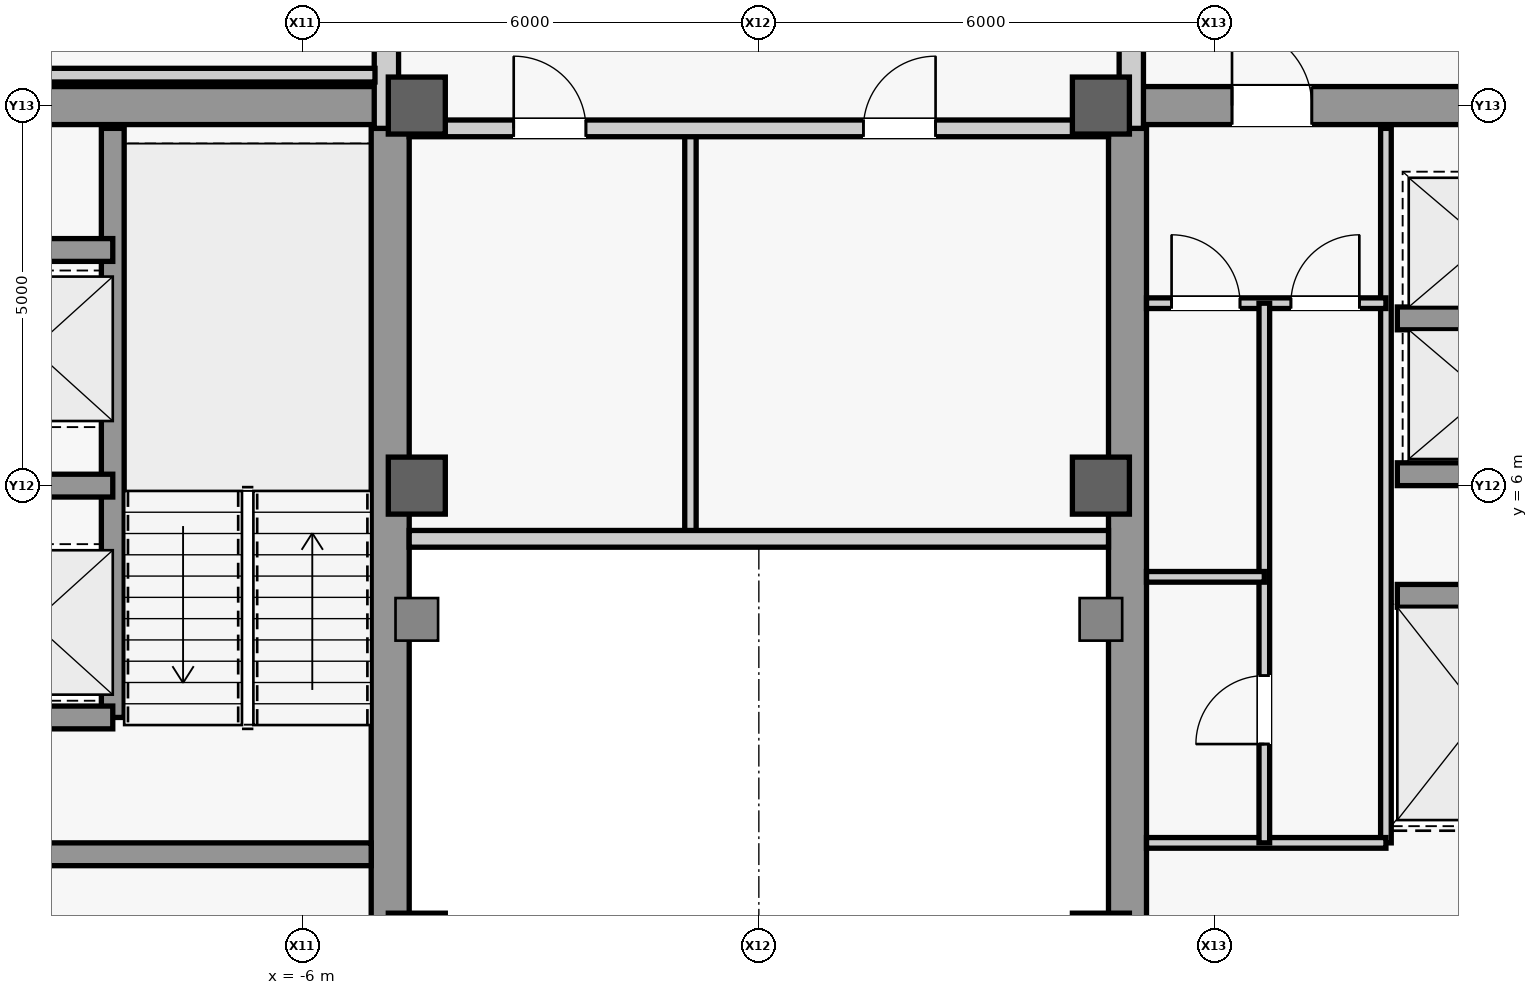
"""IFC4 building model, lengths in metres.
Left out: names, types, materials, properties, quantities, classifications, styles, units other than length and angle.
Written with IfcOpenShell. Run it as: python <this file> out.ifc"""

import sys

from ifc_helpers import new_model, si_unit, direction, frame, frame_2d, origin, origin_2d, place, context, subcontext, project, spatial, rectangle, extrude, source, transform, mapped, element, fill, save


model = new_model("IFC4")
c1 = context("Model", 3, precision=1e-05, world=origin(), true_north=direction((0.0, 1.0)))
c2 = subcontext(c1, "Body", "Model", "MODEL_VIEW")
j1 = project(units=[si_unit("LENGTHUNIT", "METRE"), si_unit("PLANEANGLEUNIT", "RADIAN")], contexts=[c1])
p1 = place(None, origin())
s1 = spatial("IfcSite", under=j1, at=p1, CompositionType="ELEMENT")
p2 = place(p1, origin())
s2 = spatial("IfcBuilding", under=s1, at=p2, CompositionType="ELEMENT")
p3 = place(p2, frame((0.0, 0.0, 350.3)))
s3 = spatial("IfcBuildingStorey", under=s2, at=p3, CompositionType="ELEMENT", Elevation=350.3)
m1 = source(origin(), c2, "Body", "SweptSolid", [
    extrude(rectangle(XDim=21.4, YDim=0.5, at=frame_2d((10.7, 0.0))), origin(), (0.0, 0.0, 1.0), 3.74),
])
for number, where, z_axis, x_axis in (
    (1, (-4.85, -10.7, 0.0), (0.0, 0.0, 1.0), (0.0, 1.0, 0.0)),
    (2, (4.85, -10.7, 0.0), (0.0, 0.0, 1.0), (0.0, 1.0, 0.0)),
):
    element("IfcWall", number, at=place(p3, frame(where, z_axis=z_axis, x_axis=x_axis)), inside=s3, PredefinedType="SHEAR", context=c2, shape_type="MappedRepresentation", body=[
        mapped(m1, transform((0.0, 0.0, 0.0), scale=1.0)),
    ])
m2 = source(origin(), c2, "Body", "SweptSolid", [
    extrude(rectangle(XDim=5.9, YDim=0.5, at=frame_2d((2.95, 0.0))), origin(), (0.0, 0.0, 1.0), 3.74),
])
p4 = place(p3, frame((-10.75, 11.0, 0.0), z_axis=(0.0, 0.0, 1.0), x_axis=(1.0, 0.0, 0.0)))
e3 = element("IfcWall", 3, at=p4, inside=s3, PredefinedType="SHEAR", context=c2, shape_type="MappedRepresentation", body=[
    mapped(m2, transform((0.0, 0.0, 0.0), scale=1.0)),
])
p5 = place(p3, frame((4.85, 11.0, 0.0), z_axis=(0.0, 0.0, 1.0), x_axis=(1.0, 0.0, 0.0)))
e4 = element("IfcWall", 4, at=p5, inside=s3, PredefinedType="SHEAR", context=c2, shape_type="MappedRepresentation", body=[
    mapped(m2, transform((0.0, 0.0, 0.0), scale=1.0)),
])
m3 = source(origin(), c2, "Body", "SweptSolid", [
    extrude(rectangle(XDim=1.05, YDim=2.2, at=frame_2d((0.525, 1.1))), frame((0.0, 0.26, 0.0), z_axis=(0.0, -1.0, 0.0), x_axis=(1.0, 0.0, 0.0)), (0.0, 0.0, 1.0), 0.52),
])
p6 = place(p5, frame((1.375, 0.0, 0.0)))
e5 = element("IfcOpeningElement", 5, at=p6, cuts=e4, PredefinedType="OPENING", context=c2, shape_type="MappedRepresentation", body=[
    mapped(m3, transform((0.0, 0.0, 0.0), scale=1.0)),
])
m4 = source(origin(), c2, "Body", "SweptSolid", [
    extrude(rectangle(XDim=5.65, YDim=0.3, at=frame_2d((2.825, 0.0))), origin(), (0.0, 0.0, 1.0), 3.74),
])
p7 = place(p3, frame((-10.75, 1.15, 0.0), z_axis=(0.0, 0.0, 1.0), x_axis=(1.0, 0.0, 0.0)))
e6 = element("IfcWall", 6, at=p7, inside=s3, PredefinedType="SHEAR", context=c2, shape_type="MappedRepresentation", body=[
    mapped(m4, transform((0.0, 0.0, 0.0), scale=1.0)),
])
m5 = source(origin(), c2, "Body", "SweptSolid", [
    extrude(rectangle(XDim=0.75, YDim=0.75, at=origin_2d()), origin(), (0.0, 0.0, 1.0), 4.0),
])
for number, where, z_axis, x_axis in (
    (7, (-4.5, 0.0, 0.0), (0.0, 0.0, 1.0), (1.0, 0.0, 0.0)),
    (8, (-4.5, 6.0, 0.0), (0.0, 0.0, 1.0), (1.0, 0.0, 0.0)),
    (9, (-4.5, 11.0, 0.0), (0.0, 0.0, 1.0), (1.0, 0.0, 0.0)),
    (10, (4.5, 0.0, 0.0), (0.0, 0.0, 1.0), (1.0, 0.0, 0.0)),
    (11, (4.5, 6.0, 0.0), (0.0, 0.0, 1.0), (1.0, 0.0, 0.0)),
    (12, (4.5, 11.0, 0.0), (0.0, 0.0, 1.0), (1.0, 0.0, 0.0)),
):
    element("IfcColumn", number, at=place(p3, frame(where, z_axis=z_axis, x_axis=x_axis)), inside=s3, PredefinedType="COLUMN", context=c2, shape_type="MappedRepresentation", body=[
        mapped(m5, transform((0.0, 0.0, 0.0), scale=1.0)),
    ])
m6 = source(origin(), c2, "Body", "SweptSolid", [
    extrude(rectangle(XDim=14.98, YDim=0.32, at=frame_2d((7.49, 0.0))), origin(), (0.0, 0.0, 1.0), 3.045),
])
for number, where, z_axis, x_axis in (
    (13, (-4.9, 10.7, 0.0), (0.0, 0.0, 1.0), (0.0, 1.0, 0.0)),
    (14, (4.9, 10.7, 0.0), (0.0, 0.0, 1.0), (0.0, 1.0, 0.0)),
):
    element("IfcWall", number, at=place(p3, frame(where, z_axis=z_axis, x_axis=x_axis)), inside=s3, PredefinedType="STANDARD", context=c2, shape_type="MappedRepresentation", body=[
        mapped(m6, transform((0.0, 0.0, 0.0), scale=1.0)),
    ])
m7 = source(origin(), c2, "Body", "SweptSolid", [
    extrude(rectangle(XDim=7.75, YDim=0.3, at=frame_2d((3.875, 0.0))), origin(), (0.0, 0.0, 1.0), 3.74),
])
p8 = place(p3, frame((-8.5, 2.95, 0.0), z_axis=(0.0, 0.0, 1.0), x_axis=(0.0, 1.0, 0.0)))
e15 = element("IfcWall", 15, at=p8, inside=s3, PredefinedType="SHEAR", context=c2, shape_type="MappedRepresentation", body=[
    mapped(m7, transform((0.0, 0.0, 0.0), scale=1.0)),
])
m8 = source(origin(), c2, "Body", "SweptSolid", [
    extrude(rectangle(XDim=2.2, YDim=0.3, at=frame_2d((1.1, 0.0))), origin(), (0.0, 0.0, 1.0), 3.74),
])
for number, where, z_axis, x_axis in (
    (16, (-10.7, 2.95, 0.0), (0.0, 0.0, 1.0), (1.0, 0.0, 0.0)),
    (17, (-10.7, 6.0, 0.0), (0.0, 0.0, 1.0), (1.0, 0.0, 0.0)),
    (18, (-10.7, 9.1, 0.0), (0.0, 0.0, 1.0), (1.0, 0.0, 0.0)),
):
    element("IfcWall", number, at=place(p3, frame(where, z_axis=z_axis, x_axis=x_axis)), inside=s3, PredefinedType="SHEAR", context=c2, shape_type="MappedRepresentation", body=[
        mapped(m8, transform((0.0, 0.0, 0.0), scale=1.0)),
    ])
m9 = source(origin(), c2, "Body", "SweptSolid", [
    extrude(rectangle(XDim=2.3, YDim=0.3, at=frame_2d((1.15, 0.0))), origin(), (0.0, 0.0, 1.0), 3.74),
])
for number, where, z_axis, x_axis in (
    (19, (8.4, 4.55, 0.0), (0.0, 0.0, 1.0), (1.0, 0.0, 0.0)),
    (20, (8.4, 6.15, 0.0), (0.0, 0.0, 1.0), (1.0, 0.0, 0.0)),
    (21, (8.4, 8.2, 0.0), (0.0, 0.0, 1.0), (1.0, 0.0, 0.0)),
):
    element("IfcWall", number, at=place(p3, frame(where, z_axis=z_axis, x_axis=x_axis)), inside=s3, PredefinedType="SHEAR", context=c2, shape_type="MappedRepresentation", body=[
        mapped(m9, transform((0.0, 0.0, 0.0), scale=1.0)),
    ])
m10 = source(origin(), c2, "Body", "SweptSolid", [
    extrude(rectangle(XDim=9.4, YDim=0.14, at=frame_2d((4.7, 0.0))), origin(), (0.0, 0.0, 1.0), 3.74),
])
p9 = place(p3, frame((8.25, 1.3, 0.0), z_axis=(0.0, 0.0, 1.0), x_axis=(0.0, 1.0, 0.0)))
e22 = element("IfcWall", 22, at=p9, inside=s3, PredefinedType="PARTITIONING", context=c2, shape_type="MappedRepresentation", body=[
    mapped(m10, transform((0.0, 0.0, 0.0), scale=1.0)),
])
m11 = source(origin(), c2, "Body", "SweptSolid", [
    extrude(rectangle(XDim=3.15, YDim=0.14, at=frame_2d((1.575, 0.0))), origin(), (0.0, 0.0, 1.0), 3.74),
])
p10 = place(p3, frame((5.1, 1.3, 0.0), z_axis=(0.0, 0.0, 1.0), x_axis=(1.0, 0.0, 0.0)))
e23 = element("IfcWall", 23, at=p10, inside=s3, PredefinedType="PARTITIONING", context=c2, shape_type="MappedRepresentation", body=[
    mapped(m11, transform((0.0, 0.0, 0.0), scale=1.0)),
])
p11 = place(p3, frame((5.1, 8.4, 0.0), z_axis=(0.0, 0.0, 1.0), x_axis=(1.0, 0.0, 0.0)))
e24 = element("IfcWall", 24, at=p11, inside=s3, PredefinedType="PARTITIONING", context=c2, shape_type="MappedRepresentation", body=[
    mapped(m11, transform((0.0, 0.0, 0.0), scale=1.0)),
])
m12 = source(origin(), c2, "Body", "SweptSolid", [
    extrude(rectangle(XDim=0.9, YDim=2.15, at=frame_2d((0.45, 1.075))), frame((0.0, 0.08, 0.0), z_axis=(0.0, -1.0, 0.0), x_axis=(1.0, 0.0, 0.0)), (0.0, 0.0, 1.0), 0.16),
])
p12 = place(p11, frame((0.33, 0.0, 0.0)))
e25 = element("IfcOpeningElement", 25, at=p12, cuts=e24, PredefinedType="OPENING", context=c2, shape_type="MappedRepresentation", body=[
    mapped(m12, transform((0.0, 0.0, 0.0), scale=1.0)),
])
p13 = place(p11, frame((1.9, 0.0, 0.0)))
e26 = element("IfcOpeningElement", 26, at=p13, cuts=e24, PredefinedType="OPENING", context=c2, shape_type="MappedRepresentation", body=[
    mapped(m12, transform((0.0, 0.0, 0.0), scale=1.0)),
])
m13 = source(origin(), c2, "Body", "SweptSolid", [
    extrude(rectangle(XDim=7.1, YDim=0.14, at=frame_2d((3.55, 0.0))), origin(), (0.0, 0.0, 1.0), 3.74),
])
p14 = place(p3, frame((6.65, 1.3, 0.0), z_axis=(0.0, 0.0, 1.0), x_axis=(0.0, 1.0, 0.0)))
e27 = element("IfcWall", 27, at=p14, inside=s3, PredefinedType="PARTITIONING", context=c2, shape_type="MappedRepresentation", body=[
    mapped(m13, transform((0.0, 0.0, 0.0), scale=1.0)),
])
p15 = place(p14, frame((1.3, 0.0, 0.0)))
e28 = element("IfcOpeningElement", 28, at=p15, cuts=e27, PredefinedType="OPENING", context=c2, shape_type="MappedRepresentation", body=[
    mapped(m12, transform((0.0, 0.0, 0.0), scale=1.0)),
])
m14 = source(origin(), c2, "Body", "SweptSolid", [
    extrude(rectangle(XDim=1.55, YDim=0.14, at=frame_2d((0.775, 0.0))), origin(), (0.0, 0.0, 1.0), 3.74),
])
p16 = place(p3, frame((5.1, 4.8, 0.0), z_axis=(0.0, 0.0, 1.0), x_axis=(1.0, 0.0, 0.0)))
e29 = element("IfcWall", 29, at=p16, inside=s3, PredefinedType="PARTITIONING", context=c2, shape_type="MappedRepresentation", body=[
    mapped(m14, transform((0.0, 0.0, 0.0), scale=1.0)),
])
m15 = source(origin(), c2, "Body", "SweptSolid", [
    extrude(rectangle(XDim=5.4, YDim=0.15, at=frame_2d((2.7, 0.0))), origin(), (0.0, 0.0, 1.0), 3.74),
])
p17 = place(p3, frame((-0.9, 5.3, 0.0), z_axis=(0.0, 0.0, 1.0), x_axis=(0.0, 1.0, 0.0)))
e30 = element("IfcWall", 30, at=p17, inside=s3, PredefinedType="PARTITIONING", context=c2, shape_type="MappedRepresentation", body=[
    mapped(m15, transform((0.0, 0.0, 0.0), scale=1.0)),
])
m16 = source(origin(), c2, "Body", "SweptSolid", [
    extrude(rectangle(XDim=9.2, YDim=0.22, at=frame_2d((4.6, 0.0))), origin(), (0.0, 0.0, 1.0), 3.74),
])
p18 = place(p3, frame((-4.6, 5.3, 0.0), z_axis=(0.0, 0.0, 1.0), x_axis=(1.0, 0.0, 0.0)))
e31 = element("IfcWall", 31, at=p18, inside=s3, PredefinedType="PARTITIONING", context=c2, shape_type="MappedRepresentation", body=[
    mapped(m16, transform((0.0, 0.0, 0.0), scale=1.0)),
])
p19 = place(p3, frame((-4.6, 10.7, 0.0), z_axis=(0.0, 0.0, 1.0), x_axis=(1.0, 0.0, 0.0)))
e32 = element("IfcWall", 32, at=p19, inside=s3, PredefinedType="PARTITIONING", context=c2, shape_type="MappedRepresentation", body=[
    mapped(m16, transform((0.0, 0.0, 0.0), scale=1.0)),
])
m17 = source(origin(), c2, "Body", "SweptSolid", [
    extrude(rectangle(XDim=0.95, YDim=2.15, at=frame_2d((0.475, 1.075))), frame((0.0, 0.12, 0.0), z_axis=(0.0, -1.0, 0.0), x_axis=(1.0, 0.0, 0.0)), (0.0, 0.0, 1.0), 0.24),
])
p20 = place(p19, frame((1.375, 0.0, 0.0)))
e33 = element("IfcOpeningElement", 33, at=p20, cuts=e32, PredefinedType="OPENING", context=c2, shape_type="MappedRepresentation", body=[
    mapped(m17, transform((0.0, 0.0, 0.0), scale=1.0)),
])
p21 = place(p19, frame((5.975, 0.0, 0.0)))
e34 = element("IfcOpeningElement", 34, at=p21, cuts=e32, PredefinedType="OPENING", context=c2, shape_type="MappedRepresentation", body=[
    mapped(m17, transform((0.0, 0.0, 0.0), scale=1.0)),
])
m18 = source(origin(), c2, "Body", "SweptSolid", [
    extrude(rectangle(XDim=12.7, YDim=0.18, at=frame_2d((6.35, 0.0))), origin(), (0.0, 0.0, 1.0), 2.79),
])
p22 = place(p3, frame((-17.75, 11.4, 0.0), z_axis=(0.0, 0.0, 1.0), x_axis=(1.0, 0.0, 0.0)))
e35 = element("IfcWall", 35, at=p22, inside=s3, PredefinedType="PARTITIONING", context=c2, shape_type="MappedRepresentation", body=[
    mapped(m18, transform((0.0, 0.0, 0.0), scale=1.0)),
])
m19 = source(origin(), c2, "Body", "SweptSolid", [
    extrude(rectangle(XDim=1.05, YDim=2.2, at=frame_2d((0.525, 1.1))), frame((0.0, 0.1, 0.0), z_axis=(0.0, -1.0, 0.0), x_axis=(1.0, 0.0, 0.0)), (0.0, 0.0, 1.0), 0.2),
])
p23 = place(p22, frame((0.675, 0.0, 0.0)))
e36 = element("IfcOpeningElement", 36, at=p23, cuts=e35, PredefinedType="OPENING", context=c2, shape_type="MappedRepresentation", body=[
    mapped(m19, transform((0.0, 0.0, 0.0), scale=1.0)),
])
m20 = source(origin(), c2, "Body", "SweptSolid", [
    extrude(rectangle(XDim=1.05, YDim=2.2, at=frame_2d((0.525, 1.1))), frame((0.0, 0.025, 0.0), z_axis=(0.0, -1.0, 0.0), x_axis=(1.0, 0.0, 0.0)), (0.0, 0.0, 1.0), 0.05),
])
p24 = place(p6, origin())
e37 = element("IfcDoor", 37, at=p24, inside=s3, OperationType="SINGLE_SWING_LEFT", PredefinedType="DOOR", context=c2, shape_type="MappedRepresentation", body=[
    mapped(m20, transform((0.0, 0.0, 0.0), scale=1.0)),
])
fill(e5, e37)
m21 = source(origin(), c2, "Body", "SweptSolid", [
    extrude(rectangle(XDim=0.9, YDim=2.15, at=frame_2d((0.45, 1.075))), frame((0.0, 0.025, 0.0), z_axis=(0.0, -1.0, 0.0), x_axis=(1.0, 0.0, 0.0)), (0.0, 0.0, 1.0), 0.05),
])
p25 = place(p12, origin())
e38 = element("IfcDoor", 38, at=p25, inside=s3, OperationType="SINGLE_SWING_LEFT", PredefinedType="DOOR", context=c2, shape_type="MappedRepresentation", body=[
    mapped(m21, transform((0.0, 0.0, 0.0), scale=1.0)),
])
fill(e25, e38)
p26 = place(p13, origin())
e39 = element("IfcDoor", 39, at=p26, inside=s3, OperationType="SINGLE_SWING_RIGHT", PredefinedType="DOOR", context=c2, shape_type="MappedRepresentation", body=[
    mapped(m21, transform((0.0, 0.0, 0.0), scale=1.0)),
])
fill(e26, e39)
p27 = place(p15, origin())
e40 = element("IfcDoor", 40, at=p27, inside=s3, OperationType="SINGLE_SWING_LEFT", PredefinedType="DOOR", context=c2, shape_type="MappedRepresentation", body=[
    mapped(m21, transform((0.0, 0.0, 0.0), scale=1.0)),
])
fill(e28, e40)
m22 = source(origin(), c2, "Body", "SweptSolid", [
    extrude(rectangle(XDim=0.95, YDim=2.15, at=frame_2d((0.475, 1.075))), frame((0.0, 0.025, 0.0), z_axis=(0.0, -1.0, 0.0), x_axis=(1.0, 0.0, 0.0)), (0.0, 0.0, 1.0), 0.05),
])
p28 = place(p20, origin())
e41 = element("IfcDoor", 41, at=p28, inside=s3, OperationType="SINGLE_SWING_LEFT", PredefinedType="DOOR", context=c2, shape_type="MappedRepresentation", body=[
    mapped(m22, transform((0.0, 0.0, 0.0), scale=1.0)),
])
fill(e33, e41)
p29 = place(p21, origin())
e42 = element("IfcDoor", 42, at=p29, inside=s3, OperationType="SINGLE_SWING_RIGHT", PredefinedType="DOOR", context=c2, shape_type="MappedRepresentation", body=[
    mapped(m22, transform((0.0, 0.0, 0.0), scale=1.0)),
])
fill(e34, e42)
save(model, sys.argv[1])
